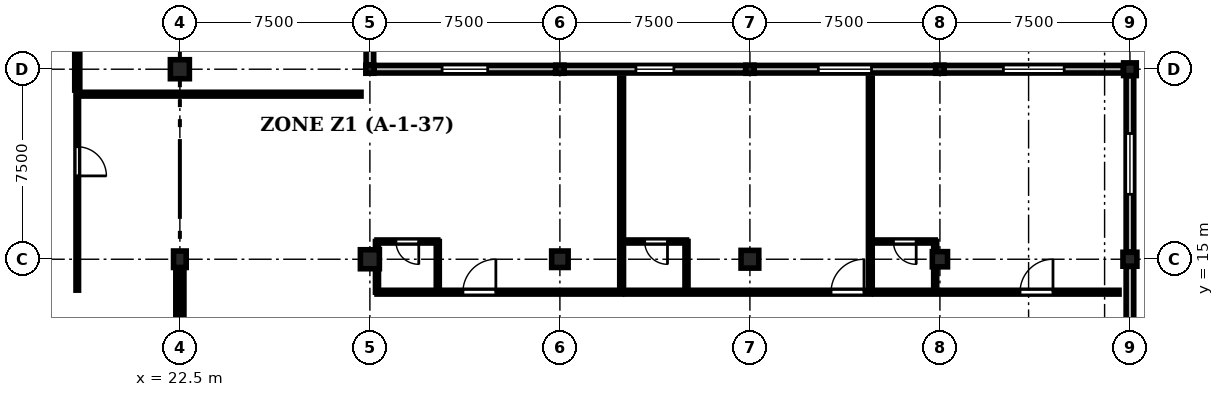
"""IFC4 building model, lengths in metres.
Left out: names, types, materials, properties, quantities, classifications, styles, units other than length and angle.
Written with IfcOpenShell. Run it as: python <this file> out.ifc"""

import sys

from ifc_helpers import new_model, si_unit, direction, frame, frame_2d, origin, origin_2d, place, context, subcontext, project, spatial, rectangle, circle, extrude, element, fill, save


model = new_model("IFC4")
c1 = context("Model", 3, precision=1e-05, world=origin(), true_north=direction((0.0, 1.0)))
c2 = subcontext(c1, "Body", "Model", "MODEL_VIEW")
j1 = project(units=[si_unit("LENGTHUNIT", "METRE"), si_unit("PLANEANGLEUNIT", "RADIAN")], contexts=[c1])
p1 = place(None, origin())
s1 = spatial("IfcSite", under=j1, at=p1, CompositionType="ELEMENT")
p2 = place(p1, origin())
s2 = spatial("IfcBuilding", under=s1, at=p2, CompositionType="ELEMENT")
p3 = place(p2, frame((0.0, 0.0, 14.1)))
s3 = spatial("IfcBuildingStorey", under=s2, at=p3, CompositionType="ELEMENT", Elevation=14.1)
p4 = place(p3, frame((22.5, 15.0, 0.0), z_axis=(0.0, 0.0, 1.0), x_axis=(1.0, 0.0, 0.0)))
e1 = element("IfcColumn", 1, at=p4, inside=s3, PredefinedType="COLUMN", context=c2, shape_type="SweptSolid", body=[
    extrude(rectangle(XDim=0.5, YDim=0.65, at=origin_2d()), origin(), (0.0, 0.0, 1.0), 3.75),
])
for number, where, z_axis, x_axis in (
    (2, (22.5, 22.5, 0.0), (0.0, 0.0, 1.0), (1.0, 0.0, 0.0)),
    (3, (30.0, 15.0, 0.0), (0.0, 0.0, 1.0), (1.0, 0.0, 0.0)),
):
    element("IfcColumn", number, at=place(p3, frame(where, z_axis=z_axis, x_axis=x_axis)), inside=s3, PredefinedType="COLUMN", context=c2, shape_type="SweptSolid", body=[
        extrude(rectangle(XDim=0.75, YDim=0.75, at=origin_2d()), origin(), (0.0, 0.0, 1.0), 3.75),
    ])
p5 = place(p3, frame((30.0, 22.5, 0.0), z_axis=(0.0, 0.0, 1.0), x_axis=(1.0, 0.0, 0.0)))
e4 = element("IfcColumn", 4, at=p5, inside=s3, PredefinedType="COLUMN", context=c2, shape_type="SweptSolid", body=[
    extrude(rectangle(XDim=0.32, YDim=0.32, at=origin_2d()), origin(), (0.0, 0.0, 1.0), 3.75),
])
p6 = place(p3, frame((37.5, 15.0, 0.0), z_axis=(0.0, 0.0, 1.0), x_axis=(1.0, 0.0, 0.0)))
e5 = element("IfcColumn", 5, at=p6, inside=s3, PredefinedType="COLUMN", context=c2, shape_type="SweptSolid", body=[
    extrude(rectangle(XDim=0.65, YDim=0.65, at=origin_2d()), origin(), (0.0, 0.0, 1.0), 3.75),
])
p7 = place(p3, frame((37.5, 22.5, 0.0), z_axis=(0.0, 0.0, 1.0), x_axis=(1.0, 0.0, 0.0)))
e6 = element("IfcColumn", 6, at=p7, inside=s3, PredefinedType="COLUMN", context=c2, shape_type="SweptSolid", body=[
    extrude(rectangle(XDim=0.32, YDim=0.32, at=origin_2d()), origin(), (0.0, 0.0, 1.0), 3.75),
])
p8 = place(p3, frame((45.0, 15.0, 0.0), z_axis=(0.0, 0.0, 1.0), x_axis=(1.0, 0.0, 0.0)))
e7 = element("IfcColumn", 7, at=p8, inside=s3, PredefinedType="COLUMN", context=c2, shape_type="SweptSolid", body=[
    extrude(rectangle(XDim=0.7, YDim=0.7, at=origin_2d()), origin(), (0.0, 0.0, 1.0), 3.75),
])
p9 = place(p3, frame((45.0, 22.5, 0.0), z_axis=(0.0, 0.0, 1.0), x_axis=(1.0, 0.0, 0.0)))
e8 = element("IfcColumn", 8, at=p9, inside=s3, PredefinedType="COLUMN", context=c2, shape_type="SweptSolid", body=[
    extrude(rectangle(XDim=0.32, YDim=0.32, at=origin_2d()), origin(), (0.0, 0.0, 1.0), 3.75),
])
p10 = place(p3, frame((52.5, 15.0, 0.0), z_axis=(0.0, 0.0, 1.0), x_axis=(1.0, 0.0, 0.0)))
e9 = element("IfcColumn", 9, at=p10, inside=s3, PredefinedType="COLUMN", context=c2, shape_type="SweptSolid", body=[
    extrude(circle(Radius=0.3, at=origin_2d()), origin(), (0.0, 0.0, 1.0), 3.75),
])
p11 = place(p3, frame((52.5, 22.5, 0.0), z_axis=(0.0, 0.0, 1.0), x_axis=(1.0, 0.0, 0.0)))
e10 = element("IfcColumn", 10, at=p11, inside=s3, PredefinedType="COLUMN", context=c2, shape_type="SweptSolid", body=[
    extrude(rectangle(XDim=0.32, YDim=0.32, at=origin_2d()), origin(), (0.0, 0.0, 1.0), 3.75),
])
p12 = place(p3, frame((60.0, 15.0, 0.0), z_axis=(0.0, 0.0, 1.0), x_axis=(1.0, 0.0, 0.0)))
e11 = element("IfcColumn", 11, at=p12, inside=s3, PredefinedType="COLUMN", context=c2, shape_type="SweptSolid", body=[
    extrude(rectangle(XDim=0.55, YDim=0.55, at=origin_2d()), origin(), (0.0, 0.0, 1.0), 3.75),
])
p13 = place(p3, frame((60.0, 22.5, 0.0), z_axis=(0.0, 0.0, 1.0), x_axis=(1.0, 0.0, 0.0)))
e12 = element("IfcColumn", 12, at=p13, inside=s3, PredefinedType="COLUMN", context=c2, shape_type="SweptSolid", body=[
    extrude(rectangle(XDim=0.5, YDim=0.5, at=origin_2d()), origin(), (0.0, 0.0, 1.0), 3.75),
])
p14 = place(p3, frame((22.5, 7.95, 0.0), z_axis=(0.0, 0.0, 1.0), x_axis=(0.0, 1.0, 0.0)))
e13 = element("IfcWall", 13, at=p14, inside=s3, PredefinedType="SHEAR", context=c2, shape_type="SweptSolid", body=[
    extrude(rectangle(XDim=6.6, YDim=0.32, at=frame_2d((3.3, 0.0))), origin(), (0.0, 0.0, 1.0), 2.92),
])
p15 = place(p3, frame((30.0, 31.33, 0.0), z_axis=(0.0, 0.0, 1.0), x_axis=(0.0, -1.0, 0.0)))
e14 = element("IfcWall", 14, at=p15, inside=s3, PredefinedType="STANDARD", context=c2, shape_type="SweptSolid", body=[
    extrude(rectangle(XDim=8.66, YDim=0.3, at=frame_2d((4.33, 0.0))), origin(), (0.0, 0.0, 1.0), 2.92),
])
p16 = place(p15, frame((3.43, 0.0, 0.9)))
e15 = element("IfcOpeningElement", 15, at=p16, cuts=e14, PredefinedType="OPENING", context=c2, shape_type="SweptSolid", body=[
    extrude(rectangle(XDim=1.8, YDim=1.74, at=frame_2d((0.9, 0.87))), frame((0.0, 0.16, 0.0), z_axis=(0.0, -1.0, 0.0), x_axis=(1.0, 0.0, 0.0)), (0.0, 0.0, 1.0), 0.32),
])
p17 = place(p3, frame((30.17, 22.5, 0.0), z_axis=(0.0, 0.0, 1.0), x_axis=(1.0, 0.0, 0.0)))
e16 = element("IfcWall", 16, at=p17, inside=s3, PredefinedType="STANDARD", context=c2, shape_type="SweptSolid", body=[
    extrude(rectangle(XDim=7.16, YDim=0.3, at=frame_2d((3.58, 0.0))), origin(), (0.0, 0.0, 1.0), 2.87),
])
p18 = place(p17, frame((2.68, 0.0, 0.9)))
e17 = element("IfcOpeningElement", 17, at=p18, cuts=e16, PredefinedType="OPENING", context=c2, shape_type="SweptSolid", body=[
    extrude(rectangle(XDim=1.8, YDim=1.69, at=frame_2d((0.9, 0.845))), frame((0.0, 0.16, 0.0), z_axis=(0.0, -1.0, 0.0), x_axis=(1.0, 0.0, 0.0)), (0.0, 0.0, 1.0), 0.32),
])
p19 = place(p3, frame((37.67, 22.5, 0.0), z_axis=(0.0, 0.0, 1.0), x_axis=(1.0, 0.0, 0.0)))
e18 = element("IfcWall", 18, at=p19, inside=s3, PredefinedType="STANDARD", context=c2, shape_type="SweptSolid", body=[
    extrude(rectangle(XDim=7.16, YDim=0.3, at=frame_2d((3.58, 0.0))), origin(), (0.0, 0.0, 1.0), 2.87),
])
p20 = place(p19, frame((2.83, 0.0, 0.9)))
e19 = element("IfcOpeningElement", 19, at=p20, cuts=e18, PredefinedType="OPENING", context=c2, shape_type="SweptSolid", body=[
    extrude(rectangle(XDim=1.5, YDim=1.69, at=frame_2d((0.75, 0.845))), frame((0.0, 0.16, 0.0), z_axis=(0.0, -1.0, 0.0), x_axis=(1.0, 0.0, 0.0)), (0.0, 0.0, 1.0), 0.32),
])
p21 = place(p3, frame((45.17, 22.5, 0.0), z_axis=(0.0, 0.0, 1.0), x_axis=(1.0, 0.0, 0.0)))
e20 = element("IfcWall", 20, at=p21, inside=s3, PredefinedType="STANDARD", context=c2, shape_type="SweptSolid", body=[
    extrude(rectangle(XDim=7.16, YDim=0.3, at=frame_2d((3.58, 0.0))), origin(), (0.0, 0.0, 1.0), 2.87),
])
p22 = place(p21, frame((2.53, 0.0, 0.9)))
e21 = element("IfcOpeningElement", 21, at=p22, cuts=e20, PredefinedType="OPENING", context=c2, shape_type="SweptSolid", body=[
    extrude(rectangle(XDim=2.1, YDim=1.69, at=frame_2d((1.05, 0.845))), frame((0.0, 0.16, 0.0), z_axis=(0.0, -1.0, 0.0), x_axis=(1.0, 0.0, 0.0)), (0.0, 0.0, 1.0), 0.32),
])
p23 = place(p3, frame((60.0, 14.715, 0.0), z_axis=(0.0, 0.0, 1.0), x_axis=(0.0, -1.0, 0.0)))
e22 = element("IfcWall", 22, at=p23, inside=s3, PredefinedType="STANDARD", context=c2, shape_type="SweptSolid", body=[
    extrude(rectangle(XDim=6.955, YDim=0.3, at=frame_2d((3.478, 0.0))), origin(), (0.0, 0.0, 1.0), 2.87),
])
p24 = place(p23, frame((2.427, 0.0, 0.9)))
e23 = element("IfcOpeningElement", 23, at=p24, cuts=e22, PredefinedType="OPENING", context=c2, shape_type="SweptSolid", body=[
    extrude(rectangle(XDim=2.1, YDim=1.69, at=frame_2d((1.05, 0.845))), frame((0.0, 0.16, 0.0), z_axis=(0.0, -1.0, 0.0), x_axis=(1.0, 0.0, 0.0)), (0.0, 0.0, 1.0), 0.32),
])
p25 = place(p3, frame((52.67, 22.5, 0.0), z_axis=(0.0, 0.0, 1.0), x_axis=(1.0, 0.0, 0.0)))
e24 = element("IfcWall", 24, at=p25, inside=s3, PredefinedType="STANDARD", context=c2, shape_type="SweptSolid", body=[
    extrude(rectangle(XDim=7.07, YDim=0.3, at=frame_2d((3.535, 0.0))), origin(), (0.0, 0.0, 1.0), 2.87),
])
p26 = place(p25, frame((2.335, 0.0, 0.9)))
e25 = element("IfcOpeningElement", 25, at=p26, cuts=e24, PredefinedType="OPENING", context=c2, shape_type="SweptSolid", body=[
    extrude(rectangle(XDim=2.4, YDim=1.69, at=frame_2d((1.2, 0.845))), frame((0.0, 0.16, 0.0), z_axis=(0.0, -1.0, 0.0), x_axis=(1.0, 0.0, 0.0)), (0.0, 0.0, 1.0), 0.32),
])
p27 = place(p3, frame((60.0, 22.24, 0.0), z_axis=(0.0, 0.0, 1.0), x_axis=(0.0, -1.0, 0.0)))
e26 = element("IfcWall", 26, at=p27, inside=s3, PredefinedType="STANDARD", context=c2, shape_type="SweptSolid", body=[
    extrude(rectangle(XDim=6.955, YDim=0.3, at=frame_2d((3.478, 0.0))), origin(), (0.0, 0.0, 1.0), 2.87),
])
p28 = place(p27, frame((2.278, 0.0, 0.9)))
e27 = element("IfcOpeningElement", 27, at=p28, cuts=e26, PredefinedType="OPENING", context=c2, shape_type="SweptSolid", body=[
    extrude(rectangle(XDim=2.4, YDim=1.69, at=frame_2d((1.2, 0.845))), frame((0.0, 0.16, 0.0), z_axis=(0.0, -1.0, 0.0), x_axis=(1.0, 0.0, 0.0)), (0.0, 0.0, 1.0), 0.32),
])
p29 = place(p3, frame((18.45, 21.515, 0.0), z_axis=(0.0, 0.0, 1.0), x_axis=(0.0, -1.0, 0.0)))
e28 = element("IfcWall", 28, at=p29, inside=s3, PredefinedType="PARTITIONING", context=c2, shape_type="SweptSolid", body=[
    extrude(rectangle(XDim=7.735, YDim=0.1, at=frame_2d((3.867, 0.0))), origin(), (0.0, 0.0, 1.0), 3.455),
])
p30 = place(p29, frame((2.075, 0.0, 0.0)))
e29 = element("IfcOpeningElement", 29, at=p30, cuts=e28, PredefinedType="OPENING", context=c2, shape_type="SweptSolid", body=[
    extrude(rectangle(XDim=1.15, YDim=2.2, at=frame_2d((0.575, 1.1))), frame((0.0, 0.06, 0.0), z_axis=(0.0, -1.0, 0.0), x_axis=(1.0, 0.0, 0.0)), (0.0, 0.0, 1.0), 0.12),
])
p31 = place(p3, frame((18.45, 29.41, 0.0), z_axis=(0.0, 0.0, 1.0), x_axis=(0.0, -1.0, 0.0)))
e30 = element("IfcWall", 30, at=p31, inside=s3, PredefinedType="STANDARD", context=c2, shape_type="SweptSolid", body=[
    extrude(rectangle(XDim=7.735, YDim=0.2, at=frame_2d((3.867, 0.0))), origin(), (0.0, 0.0, 1.0), 3.055),
])
p32 = place(p31, frame((2.075, 0.0, 0.0)))
e31 = element("IfcOpeningElement", 31, at=p32, cuts=e30, PredefinedType="OPENING", context=c2, shape_type="SweptSolid", body=[
    extrude(rectangle(XDim=1.15, YDim=2.2, at=frame_2d((0.575, 1.1))), frame((0.0, 0.11, 0.0), z_axis=(0.0, -1.0, 0.0), x_axis=(1.0, 0.0, 0.0)), (0.0, 0.0, 1.0), 0.22),
])
p33 = place(p3, frame((30.28, 13.7, 0.0), z_axis=(0.0, 0.0, 1.0), x_axis=(1.0, 0.0, 0.0)))
e32 = element("IfcWall", 32, at=p33, inside=s3, PredefinedType="PARTITIONING", context=c2, shape_type="SweptSolid", body=[
    extrude(rectangle(XDim=9.657, YDim=0.15, at=frame_2d((4.828, 0.0))), origin(), (0.0, 0.0, 1.0), 3.455),
])
p34 = place(p33, frame((3.393, 0.0, 0.0)))
e33 = element("IfcOpeningElement", 33, at=p34, cuts=e32, PredefinedType="OPENING", context=c2, shape_type="SweptSolid", body=[
    extrude(rectangle(XDim=1.3, YDim=2.2, at=frame_2d((0.65, 1.1))), frame((0.0, 0.085, 0.0), z_axis=(0.0, -1.0, 0.0), x_axis=(1.0, 0.0, 0.0)), (0.0, 0.0, 1.0), 0.17),
])
p35 = place(p3, frame((32.68, 15.7, 0.0), z_axis=(0.0, 0.0, 1.0), x_axis=(-1.0, 0.0, 0.0)))
e34 = element("IfcWall", 34, at=p35, inside=s3, PredefinedType="PARTITIONING", context=c2, shape_type="SweptSolid", body=[
    extrude(rectangle(XDim=2.4, YDim=0.12, at=frame_2d((1.2, 0.0))), origin(), (0.0, 0.0, 1.0), 3.455),
])
p36 = place(p35, frame((0.75, 0.0, 0.0)))
e35 = element("IfcOpeningElement", 35, at=p36, cuts=e34, PredefinedType="OPENING", context=c2, shape_type="SweptSolid", body=[
    extrude(rectangle(XDim=0.9, YDim=2.1, at=frame_2d((0.45, 1.05))), frame((0.0, 0.07, 0.0), z_axis=(0.0, -1.0, 0.0), x_axis=(1.0, 0.0, 0.0)), (0.0, 0.0, 1.0), 0.14),
])
p37 = place(p3, frame((32.68, 13.7, 0.0), z_axis=(0.0, 0.0, 1.0), x_axis=(0.0, 1.0, 0.0)))
e36 = element("IfcWall", 36, at=p37, inside=s3, PredefinedType="PARTITIONING", context=c2, shape_type="SweptSolid", body=[
    extrude(rectangle(XDim=2.0, YDim=0.12, at=frame_2d((1.0, 0.0))), origin(), (0.0, 0.0, 1.0), 3.455),
])
p38 = place(p3, frame((40.097, 13.7, 0.0), z_axis=(0.0, 0.0, 1.0), x_axis=(1.0, 0.0, 0.0)))
e37 = element("IfcWall", 37, at=p38, inside=s3, PredefinedType="PARTITIONING", context=c2, shape_type="SweptSolid", body=[
    extrude(rectangle(XDim=9.657, YDim=0.15, at=frame_2d((4.828, 0.0))), origin(), (0.0, 0.0, 1.0), 3.455),
])
p39 = place(p38, frame((8.107, 0.0, 0.0)))
e38 = element("IfcOpeningElement", 38, at=p39, cuts=e37, PredefinedType="OPENING", context=c2, shape_type="SweptSolid", body=[
    extrude(rectangle(XDim=1.3, YDim=2.2, at=frame_2d((0.65, 1.1))), frame((0.0, 0.085, 0.0), z_axis=(0.0, -1.0, 0.0), x_axis=(1.0, 0.0, 0.0)), (0.0, 0.0, 1.0), 0.17),
])
p40 = place(p3, frame((42.497, 15.7, 0.0), z_axis=(0.0, 0.0, 1.0), x_axis=(-1.0, 0.0, 0.0)))
e39 = element("IfcWall", 39, at=p40, inside=s3, PredefinedType="PARTITIONING", context=c2, shape_type="SweptSolid", body=[
    extrude(rectangle(XDim=2.4, YDim=0.12, at=frame_2d((1.2, 0.0))), origin(), (0.0, 0.0, 1.0), 3.455),
])
p41 = place(p40, frame((0.75, 0.0, 0.0)))
e40 = element("IfcOpeningElement", 40, at=p41, cuts=e39, PredefinedType="OPENING", context=c2, shape_type="SweptSolid", body=[
    extrude(rectangle(XDim=0.9, YDim=2.1, at=frame_2d((0.45, 1.05))), frame((0.0, 0.07, 0.0), z_axis=(0.0, -1.0, 0.0), x_axis=(1.0, 0.0, 0.0)), (0.0, 0.0, 1.0), 0.14),
])
p42 = place(p3, frame((42.497, 13.7, 0.0), z_axis=(0.0, 0.0, 1.0), x_axis=(0.0, 1.0, 0.0)))
e41 = element("IfcWall", 41, at=p42, inside=s3, PredefinedType="PARTITIONING", context=c2, shape_type="SweptSolid", body=[
    extrude(rectangle(XDim=2.0, YDim=0.12, at=frame_2d((1.0, 0.0))), origin(), (0.0, 0.0, 1.0), 3.455),
])
p43 = place(p3, frame((49.913, 13.7, 0.0), z_axis=(0.0, 0.0, 1.0), x_axis=(1.0, 0.0, 0.0)))
e42 = element("IfcWall", 42, at=p43, inside=s3, PredefinedType="PARTITIONING", context=c2, shape_type="SweptSolid", body=[
    extrude(rectangle(XDim=9.657, YDim=0.15, at=frame_2d((4.828, 0.0))), origin(), (0.0, 0.0, 1.0), 3.455),
])
p44 = place(p43, frame((5.75, 0.0, 0.0)))
e43 = element("IfcOpeningElement", 43, at=p44, cuts=e42, PredefinedType="OPENING", context=c2, shape_type="SweptSolid", body=[
    extrude(rectangle(XDim=1.3, YDim=2.2, at=frame_2d((0.65, 1.1))), frame((0.0, 0.085, 0.0), z_axis=(0.0, -1.0, 0.0), x_axis=(1.0, 0.0, 0.0)), (0.0, 0.0, 1.0), 0.17),
])
p45 = place(p3, frame((52.313, 15.7, 0.0), z_axis=(0.0, 0.0, 1.0), x_axis=(-1.0, 0.0, 0.0)))
e44 = element("IfcWall", 44, at=p45, inside=s3, PredefinedType="PARTITIONING", context=c2, shape_type="SweptSolid", body=[
    extrude(rectangle(XDim=2.4, YDim=0.12, at=frame_2d((1.2, 0.0))), origin(), (0.0, 0.0, 1.0), 3.455),
])
p46 = place(p45, frame((0.75, 0.0, 0.0)))
e45 = element("IfcOpeningElement", 45, at=p46, cuts=e44, PredefinedType="OPENING", context=c2, shape_type="SweptSolid", body=[
    extrude(rectangle(XDim=0.9, YDim=2.1, at=frame_2d((0.45, 1.05))), frame((0.0, 0.07, 0.0), z_axis=(0.0, -1.0, 0.0), x_axis=(1.0, 0.0, 0.0)), (0.0, 0.0, 1.0), 0.14),
])
p47 = place(p3, frame((52.313, 13.7, 0.0), z_axis=(0.0, 0.0, 1.0), x_axis=(0.0, 1.0, 0.0)))
e46 = element("IfcWall", 46, at=p47, inside=s3, PredefinedType="PARTITIONING", context=c2, shape_type="SweptSolid", body=[
    extrude(rectangle(XDim=2.0, YDim=0.12, at=frame_2d((1.0, 0.0))), origin(), (0.0, 0.0, 1.0), 2.905),
])
p48 = place(p3, frame((18.45, 21.515, 0.0), z_axis=(0.0, 0.0, 1.0), x_axis=(1.0, 0.0, 0.0)))
e47 = element("IfcWall", 47, at=p48, inside=s3, PredefinedType="PARTITIONING", context=c2, shape_type="SweptSolid", body=[
    extrude(rectangle(XDim=11.2, YDim=0.15, at=frame_2d((5.6, 0.0))), origin(), (0.0, 0.0, 1.0), 3.455),
])
for number, where, z_axis, x_axis in (
    (48, (39.937, 13.7, 0.0), (0.0, 0.0, 1.0), (0.0, 1.0, 0.0)),
    (49, (49.753, 13.7, 0.0), (0.0, 0.0, 1.0), (0.0, 1.0, 0.0)),
):
    element("IfcWall", number, at=place(p3, frame(where, z_axis=z_axis, x_axis=x_axis)), inside=s3, PredefinedType="PARTITIONING", context=c2, shape_type="SweptSolid", body=[
        extrude(rectangle(XDim=8.45, YDim=0.15, at=frame_2d((4.225, 0.0))), origin(), (0.0, 0.0, 1.0), 3.455),
    ])
p49 = place(p3, frame((30.28, 13.7, 0.0), z_axis=(0.0, 0.0, 1.0), x_axis=(0.0, 1.0, 0.0)))
e50 = element("IfcWall", 50, at=p49, inside=s3, PredefinedType="PARTITIONING", context=c2, shape_type="SweptSolid", body=[
    extrude(rectangle(XDim=2.0, YDim=0.12, at=frame_2d((1.0, 0.0))), origin(), (0.0, 0.0, 1.0), 2.905),
])
p50 = place(p18, origin())
e51 = element("IfcWindow", 51, at=p50, inside=s3, PartitioningType="SINGLE_PANEL", PredefinedType="WINDOW", context=c2, shape_type="SweptSolid", body=[
    extrude(rectangle(XDim=1.8, YDim=1.69, at=frame_2d((0.9, 0.845))), frame((0.0, 0.03, 0.0), z_axis=(0.0, -1.0, 0.0), x_axis=(1.0, 0.0, 0.0)), (0.0, 0.0, 1.0), 0.06),
])
fill(e17, e51)
p51 = place(p20, origin())
e52 = element("IfcWindow", 52, at=p51, inside=s3, PartitioningType="SINGLE_PANEL", PredefinedType="WINDOW", context=c2, shape_type="SweptSolid", body=[
    extrude(rectangle(XDim=1.5, YDim=1.69, at=frame_2d((0.75, 0.845))), frame((0.0, 0.03, 0.0), z_axis=(0.0, -1.0, 0.0), x_axis=(1.0, 0.0, 0.0)), (0.0, 0.0, 1.0), 0.06),
])
fill(e19, e52)
p52 = place(p22, origin())
e53 = element("IfcWindow", 53, at=p52, inside=s3, PartitioningType="SINGLE_PANEL", PredefinedType="WINDOW", context=c2, shape_type="SweptSolid", body=[
    extrude(rectangle(XDim=2.1, YDim=1.69, at=frame_2d((1.05, 0.845))), frame((0.0, 0.03, 0.0), z_axis=(0.0, -1.0, 0.0), x_axis=(1.0, 0.0, 0.0)), (0.0, 0.0, 1.0), 0.06),
])
fill(e21, e53)
p53 = place(p26, origin())
e54 = element("IfcWindow", 54, at=p53, inside=s3, PartitioningType="SINGLE_PANEL", PredefinedType="WINDOW", context=c2, shape_type="SweptSolid", body=[
    extrude(rectangle(XDim=2.4, YDim=1.69, at=frame_2d((1.2, 0.845))), frame((0.0, 0.03, 0.0), z_axis=(0.0, -1.0, 0.0), x_axis=(1.0, 0.0, 0.0)), (0.0, 0.0, 1.0), 0.06),
])
fill(e25, e54)
p54 = place(p28, origin())
e55 = element("IfcWindow", 55, at=p54, inside=s3, PartitioningType="SINGLE_PANEL", PredefinedType="WINDOW", context=c2, shape_type="SweptSolid", body=[
    extrude(rectangle(XDim=2.4, YDim=1.69, at=frame_2d((1.2, 0.845))), frame((0.0, 0.03, 0.0), z_axis=(0.0, -1.0, 0.0), x_axis=(1.0, 0.0, 0.0)), (0.0, 0.0, 1.0), 0.06),
])
fill(e27, e55)
p55 = place(p30, origin())
e56 = element("IfcDoor", 56, at=p55, inside=s3, OperationType="SINGLE_SWING_RIGHT", PredefinedType="DOOR", context=c2, shape_type="SweptSolid", body=[
    extrude(rectangle(XDim=1.15, YDim=2.2, at=frame_2d((0.575, 1.1))), frame((0.0, 0.025, 0.0), z_axis=(0.0, -1.0, 0.0), x_axis=(1.0, 0.0, 0.0)), (0.0, 0.0, 1.0), 0.05),
])
fill(e29, e56)
p56 = place(p34, origin())
e57 = element("IfcDoor", 57, at=p56, inside=s3, OperationType="SINGLE_SWING_RIGHT", PredefinedType="DOOR", context=c2, shape_type="SweptSolid", body=[
    extrude(rectangle(XDim=1.3, YDim=2.2, at=frame_2d((0.65, 1.1))), frame((0.0, 0.025, 0.0), z_axis=(0.0, -1.0, 0.0), x_axis=(1.0, 0.0, 0.0)), (0.0, 0.0, 1.0), 0.05),
])
fill(e33, e57)
p57 = place(p36, origin())
e58 = element("IfcDoor", 58, at=p57, inside=s3, OperationType="SINGLE_SWING_LEFT", PredefinedType="DOOR", context=c2, shape_type="SweptSolid", body=[
    extrude(rectangle(XDim=0.9, YDim=2.1, at=frame_2d((0.45, 1.05))), frame((0.0, 0.025, 0.0), z_axis=(0.0, -1.0, 0.0), x_axis=(1.0, 0.0, 0.0)), (0.0, 0.0, 1.0), 0.05),
])
fill(e35, e58)
p58 = place(p39, origin())
e59 = element("IfcDoor", 59, at=p58, inside=s3, OperationType="SINGLE_SWING_RIGHT", PredefinedType="DOOR", context=c2, shape_type="SweptSolid", body=[
    extrude(rectangle(XDim=1.3, YDim=2.2, at=frame_2d((0.65, 1.1))), frame((0.0, 0.025, 0.0), z_axis=(0.0, -1.0, 0.0), x_axis=(1.0, 0.0, 0.0)), (0.0, 0.0, 1.0), 0.05),
])
fill(e38, e59)
p59 = place(p41, origin())
e60 = element("IfcDoor", 60, at=p59, inside=s3, OperationType="SINGLE_SWING_LEFT", PredefinedType="DOOR", context=c2, shape_type="SweptSolid", body=[
    extrude(rectangle(XDim=0.9, YDim=2.1, at=frame_2d((0.45, 1.05))), frame((0.0, 0.025, 0.0), z_axis=(0.0, -1.0, 0.0), x_axis=(1.0, 0.0, 0.0)), (0.0, 0.0, 1.0), 0.05),
])
fill(e40, e60)
p60 = place(p44, origin())
e61 = element("IfcDoor", 61, at=p60, inside=s3, OperationType="SINGLE_SWING_RIGHT", PredefinedType="DOOR", context=c2, shape_type="SweptSolid", body=[
    extrude(rectangle(XDim=1.3, YDim=2.2, at=frame_2d((0.65, 1.1))), frame((0.0, 0.025, 0.0), z_axis=(0.0, -1.0, 0.0), x_axis=(1.0, 0.0, 0.0)), (0.0, 0.0, 1.0), 0.05),
])
fill(e43, e61)
p61 = place(p46, origin())
e62 = element("IfcDoor", 62, at=p61, inside=s3, OperationType="SINGLE_SWING_LEFT", PredefinedType="DOOR", context=c2, shape_type="SweptSolid", body=[
    extrude(rectangle(XDim=0.9, YDim=2.1, at=frame_2d((0.45, 1.05))), frame((0.0, 0.025, 0.0), z_axis=(0.0, -1.0, 0.0), x_axis=(1.0, 0.0, 0.0)), (0.0, 0.0, 1.0), 0.05),
])
fill(e45, e62)
save(model, sys.argv[1])
